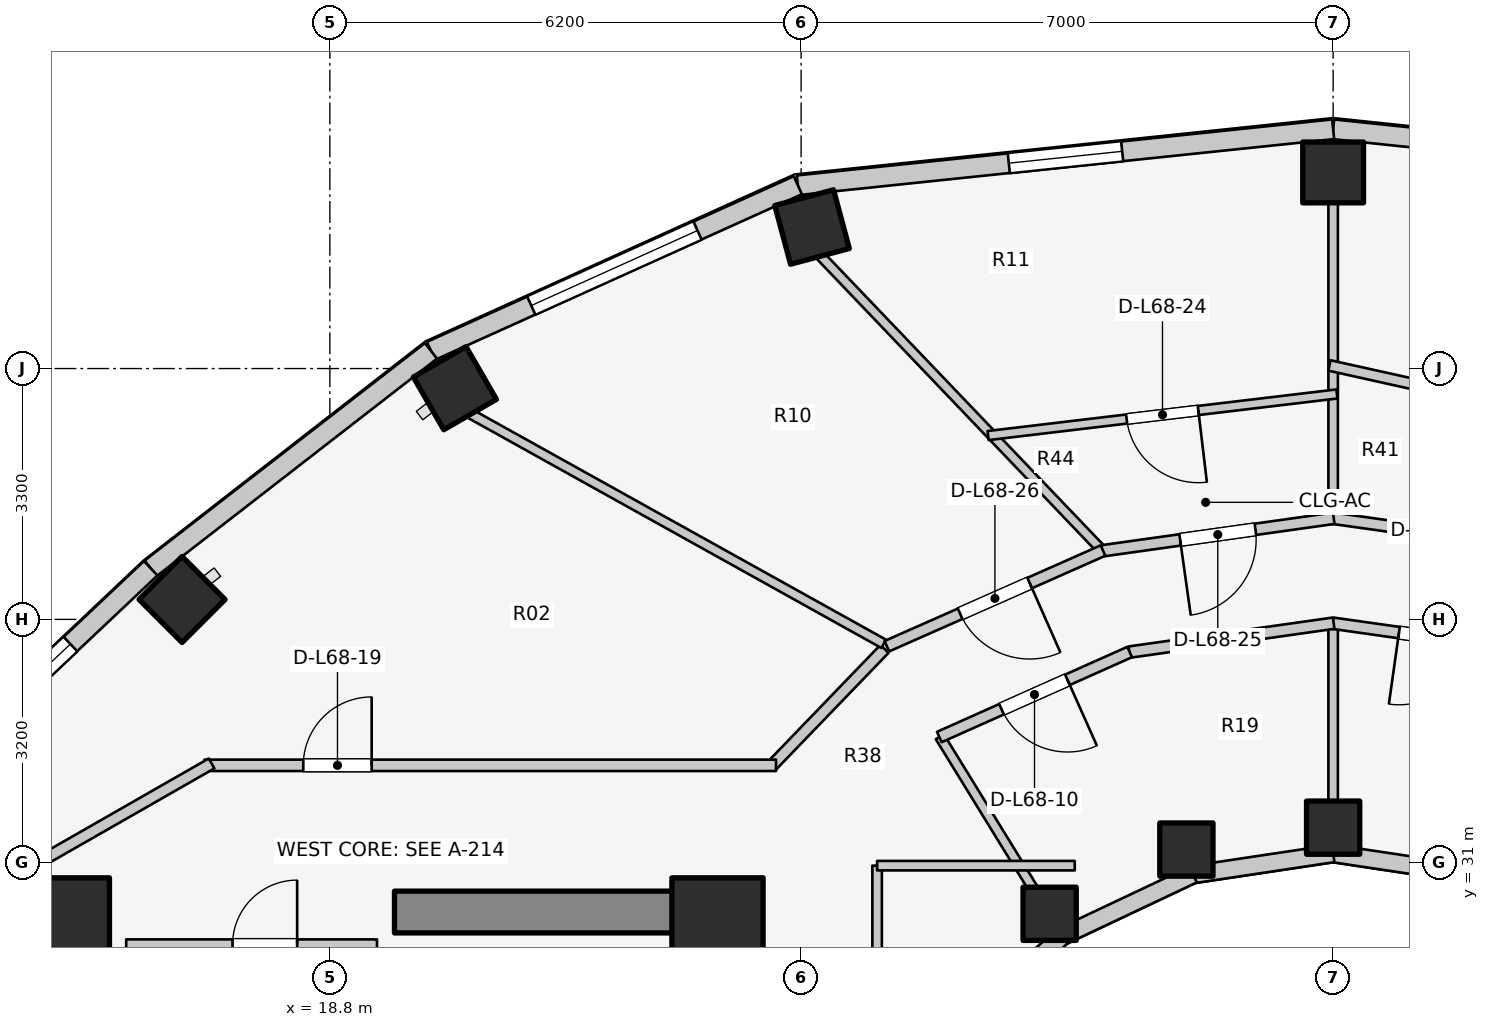
"""IFC4 building model, lengths in metres.
Left out: names, types, materials, properties, quantities, classifications, styles, units other than length and angle.
Written with IfcOpenShell. Run it as: python <this file> out.ifc"""

import sys

from ifc_helpers import new_model, si_unit, direction, frame, frame_2d, origin, origin_2d, place, context, subcontext, project, spatial, rectangle, extrude, element, fill, save


model = new_model("IFC4")
c1 = context("Model", 3, precision=1e-05, world=origin(), true_north=direction((0.0, 1.0)))
c2 = subcontext(c1, "Body", "Model", "MODEL_VIEW")
j1 = project(units=[si_unit("LENGTHUNIT", "METRE"), si_unit("PLANEANGLEUNIT", "RADIAN")], contexts=[c1])
p1 = place(None, origin())
s1 = spatial("IfcSite", under=j1, at=p1, CompositionType="ELEMENT")
p2 = place(p1, origin())
s2 = spatial("IfcBuilding", under=s1, at=p2, CompositionType="ELEMENT")
p3 = place(p2, frame((0.0, 0.0, 223.3)))
s3 = spatial("IfcBuildingStorey", under=s2, at=p3, CompositionType="ELEMENT", Elevation=223.3)
p4 = place(p3, frame((19.65, 30.35, 0.0), z_axis=(0.0, 0.0, 1.0), x_axis=(1.0, 0.0, 0.0)))
e1 = element("IfcWall", 1, at=p4, inside=s3, PredefinedType="SHEAR", context=c2, shape_type="SweptSolid", body=[
    extrude(rectangle(XDim=4.5, YDim=0.55, at=frame_2d((2.25, 0.0))), origin(), (0.0, 0.0, 1.0), 3.1),
])
for number, where, z_axis, x_axis in (
    (2, (23.9, 30.2, 0.0), (0.0, 0.0, 1.0), (1.0, 0.0, 0.0)),
    (3, (15.3, 30.2, 0.0), (0.0, 0.0, 1.0), (1.0, 0.0, 0.0)),
):
    element("IfcColumn", number, at=place(p3, frame(where, z_axis=z_axis, x_axis=x_axis)), inside=s3, PredefinedType="COLUMN", context=c2, shape_type="SweptSolid", body=[
        extrude(rectangle(XDim=1.2, YDim=1.2, at=origin_2d()), origin(), (0.0, 0.0, 1.0), 3.1),
    ])
p5 = place(p3, frame((32.0, 31.46, 0.0), z_axis=(0.0, 0.0, 1.0), x_axis=(1.0, 0.0, 0.0)))
e4 = element("IfcColumn", 4, at=p5, inside=s3, PredefinedType="COLUMN", context=c2, shape_type="SweptSolid", body=[
    extrude(rectangle(XDim=0.7, YDim=0.7, at=origin_2d()), origin(), (0.0, 0.0, 1.0), 3.1),
])
p6 = place(p3, frame((32.0, 40.08, 0.0), z_axis=(0.0, 0.0, 1.0), x_axis=(0.0, 1.0, 0.0)))
e5 = element("IfcColumn", 5, at=p6, inside=s3, PredefinedType="COLUMN", context=c2, shape_type="SweptSolid", body=[
    extrude(rectangle(XDim=0.8, YDim=0.8, at=origin_2d()), origin(), (0.0, 0.0, 1.0), 3.1),
])
p7 = place(p3, frame((30.069, 31.172, 0.0), z_axis=(0.0, 0.0, 1.0), x_axis=(1.0, 0.0, 0.0)))
e6 = element("IfcColumn", 6, at=p7, inside=s3, PredefinedType="COLUMN", context=c2, shape_type="SweptSolid", body=[
    extrude(rectangle(XDim=0.7, YDim=0.7, at=origin_2d()), origin(), (0.0, 0.0, 1.0), 3.1),
])
p8 = place(p3, frame((25.144, 39.362, 0.0), z_axis=(0.0, 0.0, 1.0), x_axis=(-0.258819045103, 0.965925826289, 0.0)))
e7 = element("IfcColumn", 7, at=p8, inside=s3, PredefinedType="COLUMN", context=c2, shape_type="SweptSolid", body=[
    extrude(rectangle(XDim=0.8, YDim=0.8, at=origin_2d()), origin(), (0.0, 0.0, 1.0), 3.1),
])
p9 = place(p3, frame((28.27, 30.327, 0.0), z_axis=(0.0, 0.0, 1.0), x_axis=(1.0, 0.0, 0.0)))
e8 = element("IfcColumn", 8, at=p9, inside=s3, PredefinedType="COLUMN", context=c2, shape_type="SweptSolid", body=[
    extrude(rectangle(XDim=0.7, YDim=0.7, at=origin_2d()), origin(), (0.0, 0.0, 1.0), 3.1),
])
for number, where, z_axis, x_axis in (
    (9, (20.445, 37.241, 0.0), (0.0, 0.0, 1.0), (-0.5, 0.866, 0.0)),
    (10, (16.855, 34.462, 0.0), (0.0, 0.0, 1.0), (-0.707, 0.707, 0.0)),
):
    element("IfcColumn", number, at=place(p3, frame(where, z_axis=z_axis, x_axis=x_axis)), inside=s3, PredefinedType="COLUMN", context=c2, shape_type="SweptSolid", body=[
        extrude(rectangle(XDim=0.8, YDim=0.8, at=origin_2d()), origin(), (0.0, 0.0, 1.0), 3.1),
    ])
for number, where, z_axis, x_axis in (
    (11, (33.843, 30.843, 0.0), (0.0, 0.0, 1.0), (-0.989, 0.149, 0.0)),
    (12, (32.0, 31.12, 0.0), (0.0, 0.0, 1.0), (-0.989, -0.149, 0.0)),
):
    element("IfcWall", number, at=place(p3, frame(where, z_axis=z_axis, x_axis=x_axis)), inside=s3, PredefinedType="STANDARD", context=c2, shape_type="SweptSolid", body=[
        extrude(rectangle(XDim=1.864, YDim=0.23, at=frame_2d((0.932, 0.0))), origin(), (0.0, 0.0, 1.0), 2.16),
    ])
p10 = place(p3, frame((30.157, 30.843, 0.0), z_axis=(0.0, 0.0, 1.0), x_axis=(-0.904179699603, -0.427152280606, 0.0)))
e13 = element("IfcWall", 13, at=p10, inside=s3, PredefinedType="STANDARD", context=c2, shape_type="SweptSolid", body=[
    extrude(rectangle(XDim=1.899, YDim=0.23, at=frame_2d((0.95, 0.0))), origin(), (0.0, 0.0, 1.0), 2.16),
])
p11 = place(p3, frame((28.44, 30.032, 0.0), z_axis=(0.0, 0.0, 1.0), x_axis=(-0.752576694707, -0.658504607869, 0.0)))
e14 = element("IfcWall", 14, at=p11, inside=s3, PredefinedType="STANDARD", context=c2, shape_type="SweptSolid", body=[
    extrude(rectangle(XDim=1.959, YDim=0.23, at=frame_2d((0.98, 0.0))), origin(), (0.0, 0.0, 1.0), 2.16),
])
p12 = place(p3, frame((39.043, 39.912, 0.0), z_axis=(0.0, 0.0, 1.0), x_axis=(-0.994582822721, 0.103947144014, 0.0)))
e15 = element("IfcWall", 15, at=p12, inside=s3, PredefinedType="STANDARD", context=c2, shape_type="SweptSolid", body=[
    extrude(rectangle(XDim=7.081, YDim=0.26, at=frame_2d((3.541, 0.0))), origin(), (0.0, 0.0, 1.0), 2.85),
])
p13 = place(p12, frame((2.791, 0.0, 0.75)))
e16 = element("IfcOpeningElement", 16, at=p13, cuts=e15, PredefinedType="OPENING", context=c2, shape_type="SweptSolid", body=[
    extrude(rectangle(XDim=1.5, YDim=1.6, at=frame_2d((0.75, 0.8))), frame((0.0, 0.14, 0.0), z_axis=(0.0, -1.0, 0.0), x_axis=(1.0, 0.0, 0.0)), (0.0, 0.0, 1.0), 0.28),
])
p14 = place(p3, frame((32.0, 40.648, 0.0), z_axis=(0.0, 0.0, 1.0), x_axis=(-0.994582822721, -0.103947144014, 0.0)))
e17 = element("IfcWall", 17, at=p14, inside=s3, PredefinedType="STANDARD", context=c2, shape_type="SweptSolid", body=[
    extrude(rectangle(XDim=7.081, YDim=0.26, at=frame_2d((3.541, 0.0))), origin(), (0.0, 0.0, 1.0), 2.85),
])
p15 = place(p14, frame((2.791, 0.0, 0.75)))
e18 = element("IfcOpeningElement", 18, at=p15, cuts=e17, PredefinedType="OPENING", context=c2, shape_type="SweptSolid", body=[
    extrude(rectangle(XDim=1.5, YDim=1.6, at=frame_2d((0.75, 0.8))), frame((0.0, 0.14, 0.0), z_axis=(0.0, -1.0, 0.0), x_axis=(1.0, 0.0, 0.0)), (0.0, 0.0, 1.0), 0.28),
])
p16 = place(p3, frame((24.957, 39.912, 0.0), z_axis=(0.0, 0.0, 1.0), x_axis=(-0.911427484938, -0.411460738952, 0.0)))
e19 = element("IfcWall", 19, at=p16, inside=s3, PredefinedType="STANDARD", context=c2, shape_type="SweptSolid", body=[
    extrude(rectangle(XDim=5.296, YDim=0.26, at=frame_2d((2.648, 0.0))), origin(), (0.0, 0.0, 1.0), 2.85),
])
p17 = place(p16, frame((1.448, 0.0, 0.75)))
e20 = element("IfcOpeningElement", 20, at=p17, cuts=e19, PredefinedType="OPENING", context=c2, shape_type="SweptSolid", body=[
    extrude(rectangle(XDim=2.4, YDim=1.7, at=frame_2d((1.2, 0.85))), frame((0.0, 0.14, 0.0), z_axis=(0.0, -1.0, 0.0), x_axis=(1.0, 0.0, 0.0)), (0.0, 0.0, 1.0), 0.28),
])
p18 = place(p3, frame((20.13, 37.733, 0.0), z_axis=(0.0, 0.0, 1.0), x_axis=(-0.790126214723, -0.612944177563, 0.0)))
e21 = element("IfcWall", 21, at=p18, inside=s3, PredefinedType="STANDARD", context=c2, shape_type="SweptSolid", body=[
    extrude(rectangle(XDim=4.667, YDim=0.26, at=frame_2d((2.333, 0.0))), origin(), (0.0, 0.0, 1.0), 2.85),
])
p19 = place(p3, frame((16.442, 34.872, 0.0), z_axis=(0.0, 0.0, 1.0), x_axis=(-0.72731899451, -0.686299555752, 0.0)))
e22 = element("IfcWall", 22, at=p19, inside=s3, PredefinedType="STANDARD", context=c2, shape_type="SweptSolid", body=[
    extrude(rectangle(XDim=4.404, YDim=0.26, at=frame_2d((2.202, 0.0))), origin(), (0.0, 0.0, 1.0), 2.85),
])
p20 = place(p19, frame((1.452, 0.0, 0.75)))
e23 = element("IfcOpeningElement", 23, at=p20, cuts=e22, PredefinedType="OPENING", context=c2, shape_type="SweptSolid", body=[
    extrude(rectangle(XDim=1.5, YDim=1.6, at=frame_2d((0.75, 0.8))), frame((0.0, 0.14, 0.0), z_axis=(0.0, -1.0, 0.0), x_axis=(1.0, 0.0, 0.0)), (0.0, 0.0, 1.0), 0.28),
])
p21 = place(p3, frame((16.12, 29.92, 0.0), z_axis=(0.0, 0.0, 1.0), x_axis=(1.0, 0.0, 0.0)))
e24 = element("IfcWall", 24, at=p21, inside=s3, PredefinedType="PLUMBINGWALL", context=c2, shape_type="SweptSolid", body=[
    extrude(rectangle(XDim=3.3, YDim=0.14, at=frame_2d((1.65, 0.0))), origin(), (0.0, 0.0, 1.0), 2.855),
])
p22 = place(p21, frame((1.399, 0.0, 0.0)))
e25 = element("IfcOpeningElement", 25, at=p22, cuts=e24, PredefinedType="OPENING", context=c2, shape_type="SweptSolid", body=[
    extrude(rectangle(XDim=0.85, YDim=2.05, at=frame_2d((0.425, 1.025))), frame((0.0, 0.08, 0.0), z_axis=(0.0, -1.0, 0.0), x_axis=(1.0, 0.0, 0.0)), (0.0, 0.0, 1.0), 0.16),
])
p23 = place(p3, frame((32.0, 31.1, 0.0), z_axis=(0.0, 0.0, 1.0), x_axis=(0.0, 1.0, 0.0)))
e26 = element("IfcWall", 26, at=p23, inside=s3, PredefinedType="PARTITIONING", context=c2, shape_type="SweptSolid", body=[
    extrude(rectangle(XDim=3.05, YDim=0.125, at=frame_2d((1.525, 0.0))), origin(), (0.0, 0.0, 1.0), 2.376),
])
p24 = place(p3, frame((28.45, 30.015, 0.0), z_axis=(0.0, 0.0, 1.0), x_axis=(-0.523992004803, 0.851723182086, 0.0)))
e27 = element("IfcWall", 27, at=p24, inside=s3, PredefinedType="PARTITIONING", context=c2, shape_type="SweptSolid", body=[
    extrude(rectangle(XDim=3.101, YDim=0.125, at=frame_2d((1.551, 0.0))), origin(), (0.0, 0.0, 1.0), 2.376),
])
p25 = place(p3, frame((34.68, 33.77, 0.0), z_axis=(0.0, 0.0, 1.0), x_axis=(-0.990132151456, 0.140136799779, 0.0)))
e28 = element("IfcWall", 28, at=p25, inside=s3, PredefinedType="PARTITIONING", context=c2, shape_type="SweptSolid", body=[
    extrude(rectangle(XDim=2.714, YDim=0.15, at=frame_2d((1.357, 0.0))), origin(), (0.0, 0.0, 1.0), 2.376),
])
p26 = place(p25, frame((0.882, 0.0, 0.0)))
e29 = element("IfcOpeningElement", 29, at=p26, cuts=e28, PredefinedType="OPENING", context=c2, shape_type="SweptSolid", body=[
    extrude(rectangle(XDim=0.95, YDim=2.1, at=frame_2d((0.475, 1.05))), frame((0.0, 0.085, 0.0), z_axis=(0.0, -1.0, 0.0), x_axis=(1.0, 0.0, 0.0)), (0.0, 0.0, 1.0), 0.17),
])
p27 = place(p3, frame((32.007, 34.15, 0.0), z_axis=(0.0, 0.0, 1.0), x_axis=(-0.990132151456, -0.140136799779, 0.0)))
e30 = element("IfcWall", 30, at=p27, inside=s3, PredefinedType="PARTITIONING", context=c2, shape_type="SweptSolid", body=[
    extrude(rectangle(XDim=2.714, YDim=0.15, at=frame_2d((1.357, 0.0))), origin(), (0.0, 0.0, 1.0), 2.376),
])
p28 = place(p3, frame((29.323, 33.771, 0.0), z_axis=(0.0, 0.0, 1.0), x_axis=(-0.913120130558, -0.407690602257, 0.0)))
e31 = element("IfcWall", 31, at=p28, inside=s3, PredefinedType="PARTITIONING", context=c2, shape_type="SweptSolid", body=[
    extrude(rectangle(XDim=2.743, YDim=0.15, at=frame_2d((1.371, 0.0))), origin(), (0.0, 0.0, 1.0), 2.376),
])
p29 = place(p28, frame((0.896, 0.0, 0.0)))
e32 = element("IfcOpeningElement", 32, at=p29, cuts=e31, PredefinedType="OPENING", context=c2, shape_type="SweptSolid", body=[
    extrude(rectangle(XDim=0.95, YDim=2.1, at=frame_2d((0.475, 1.05))), frame((0.0, 0.085, 0.0), z_axis=(0.0, -1.0, 0.0), x_axis=(1.0, 0.0, 0.0)), (0.0, 0.0, 1.0), 0.17),
])
p30 = place(p3, frame((26.0, 25.8, 0.0), z_axis=(0.0, 0.0, 1.0), x_axis=(0.0, 1.0, 0.0)))
e33 = element("IfcWall", 33, at=p30, inside=s3, PredefinedType="PARTITIONING", context=c2, shape_type="SweptSolid", body=[
    extrude(rectangle(XDim=5.16, YDim=0.125, at=frame_2d((2.58, 0.0))), origin(), (0.0, 0.0, 1.0), 2.232),
])
p31 = place(p3, frame((26.0, 30.96, 0.0), z_axis=(0.0, 0.0, 1.0), x_axis=(1.0, 0.0, 0.0)))
e34 = element("IfcWall", 34, at=p31, inside=s3, PredefinedType="PARTITIONING", context=c2, shape_type="SweptSolid", body=[
    extrude(rectangle(XDim=2.6, YDim=0.125, at=frame_2d((1.3, 0.0))), origin(), (0.0, 0.0, 1.0), 2.376),
])
p32 = place(p3, frame((26.097, 33.812, 0.0), z_axis=(0.0, 0.0, 1.0), x_axis=(-0.694032962553, -0.719943224768, 0.0)))
e35 = element("IfcWall", 35, at=p32, inside=s3, PredefinedType="PARTITIONING", context=c2, shape_type="SweptSolid", body=[
    extrude(rectangle(XDim=2.158, YDim=0.15, at=frame_2d((1.079, 0.0))), origin(), (0.0, 0.0, 1.0), 2.376),
])
p33 = place(p3, frame((17.15, 32.28, 0.0), z_axis=(0.0, 0.0, 1.0), x_axis=(1.0, 0.0, 0.0)))
e36 = element("IfcWall", 36, at=p33, inside=s3, PredefinedType="PARTITIONING", context=c2, shape_type="SweptSolid", body=[
    extrude(rectangle(XDim=7.52, YDim=0.15, at=frame_2d((3.76, 0.0))), origin(), (0.0, 0.0, 1.0), 2.376),
])
p34 = place(p33, frame((1.3, 0.0, 0.0)))
e37 = element("IfcOpeningElement", 37, at=p34, cuts=e36, PredefinedType="OPENING", context=c2, shape_type="SweptSolid", body=[
    extrude(rectangle(XDim=0.9, YDim=2.1, at=frame_2d((0.45, 1.05))), frame((0.0, 0.085, 0.0), z_axis=(0.0, -1.0, 0.0), x_axis=(1.0, 0.0, 0.0)), (0.0, 0.0, 1.0), 0.17),
])
p35 = place(p3, frame((17.243, 32.305, 0.0), z_axis=(0.0, 0.0, 1.0), x_axis=(-0.867991349648, -0.496579315857, 0.0)))
e38 = element("IfcWall", 38, at=p35, inside=s3, PredefinedType="PARTITIONING", context=c2, shape_type="SweptSolid", body=[
    extrude(rectangle(XDim=2.567, YDim=0.15, at=frame_2d((1.283, 0.0))), origin(), (0.0, 0.0, 1.0), 2.22),
])
p36 = place(p3, frame((32.0, 35.585, 0.0), z_axis=(0.0, 0.0, 1.0), x_axis=(0.0, 1.0, 0.0)))
e39 = element("IfcWall", 39, at=p36, inside=s3, PredefinedType="PARTITIONING", context=c2, shape_type="SweptSolid", body=[
    extrude(rectangle(XDim=4.115, YDim=0.125, at=frame_2d((2.058, 0.0))), origin(), (0.0, 0.0, 1.0), 2.376),
])
p37 = place(p3, frame((28.926, 35.143, 0.0), z_axis=(0.0, 0.0, 1.0), x_axis=(-0.691128003726, 0.722732372642, 0.0)))
e40 = element("IfcWall", 40, at=p37, inside=s3, PredefinedType="PARTITIONING", context=c2, shape_type="SweptSolid", body=[
    extrude(rectangle(XDim=5.33, YDim=0.125, at=frame_2d((2.665, 0.0))), origin(), (0.0, 0.0, 1.0), 2.376),
])
p38 = place(p3, frame((26.087, 33.878, 0.0), z_axis=(0.0, 0.0, 1.0), x_axis=(-0.87377679808, 0.486327160599, 0.0)))
e41 = element("IfcWall", 41, at=p38, inside=s3, PredefinedType="PARTITIONING", context=c2, shape_type="SweptSolid", body=[
    extrude(rectangle(XDim=6.24, YDim=0.125, at=frame_2d((3.12, 0.0))), origin(), (0.0, 0.0, 1.0), 2.376),
])
p39 = place(p3, frame((35.085, 35.096, 0.0), z_axis=(0.0, 0.0, 1.0), x_axis=(-0.990254086283, 0.139272555084, 0.0)))
e42 = element("IfcWall", 42, at=p39, inside=s3, PredefinedType="PARTITIONING", context=c2, shape_type="SweptSolid", body=[
    extrude(rectangle(XDim=3.166, YDim=0.15, at=frame_2d((1.583, 0.0))), origin(), (0.0, 0.0, 1.0), 2.376),
])
p40 = place(p3, frame((36.467, 36.538, 0.0), z_axis=(0.0, 0.0, 1.0), x_axis=(-0.976214372251, 0.21680751696, 0.0)))
e43 = element("IfcWall", 43, at=p40, inside=s3, PredefinedType="PLUMBINGWALL", context=c2, shape_type="SweptSolid", body=[
    extrude(rectangle(XDim=4.626, YDim=0.14, at=frame_2d((2.313, 0.0))), origin(), (0.0, 0.0, 1.0), 2.376),
])
p41 = place(p40, frame((1.863, 0.0, 0.0)))
e44 = element("IfcOpeningElement", 44, at=p41, cuts=e43, PredefinedType="OPENING", context=c2, shape_type="SweptSolid", body=[
    extrude(rectangle(XDim=0.9, YDim=2.1, at=frame_2d((0.45, 1.05))), frame((0.0, 0.08, 0.0), z_axis=(0.0, -1.0, 0.0), x_axis=(1.0, 0.0, 0.0)), (0.0, 0.0, 1.0), 0.16),
])
p42 = place(p3, frame((32.05, 37.166, 0.0), z_axis=(0.0, 0.0, 1.0), x_axis=(-0.992963303559, -0.118422454736, 0.0)))
e45 = element("IfcWall", 45, at=p42, inside=s3, PredefinedType="MOVABLE", context=c2, shape_type="SweptSolid", body=[
    extrude(rectangle(XDim=4.622, YDim=0.12, at=frame_2d((2.311, 0.0))), origin(), (0.0, 0.0, 1.0), 2.376),
])
p43 = place(p42, frame((1.836, 0.0, 0.0)))
e46 = element("IfcOpeningElement", 46, at=p43, cuts=e45, PredefinedType="OPENING", context=c2, shape_type="SweptSolid", body=[
    extrude(rectangle(XDim=0.95, YDim=2.1, at=frame_2d((0.475, 1.05))), frame((0.0, 0.07, 0.0), z_axis=(0.0, -1.0, 0.0), x_axis=(1.0, 0.0, 0.0)), (0.0, 0.0, 1.0), 0.14),
])
p44 = place(p3, frame((32.008, 35.53, 0.0), z_axis=(0.0, 0.0, 1.0), x_axis=(-0.990257602807, -0.139247549651, 0.0)))
e47 = element("IfcWall", 47, at=p44, inside=s3, PredefinedType="PARTITIONING", context=c2, shape_type="SweptSolid", body=[
    extrude(rectangle(XDim=3.082, YDim=0.15, at=frame_2d((1.541, 0.0))), origin(), (0.0, 0.0, 1.0), 2.376),
])
p45 = place(p44, frame((1.041, 0.0, 0.0)))
e48 = element("IfcOpeningElement", 48, at=p45, cuts=e47, PredefinedType="OPENING", context=c2, shape_type="SweptSolid", body=[
    extrude(rectangle(XDim=1.0, YDim=2.1, at=frame_2d((0.5, 1.05))), frame((0.0, 0.085, 0.0), z_axis=(0.0, -1.0, 0.0), x_axis=(1.0, 0.0, 0.0)), (0.0, 0.0, 1.0), 0.17),
])
p46 = place(p3, frame((28.972, 35.105, 0.0), z_axis=(0.0, 0.0, 1.0), x_axis=(-0.914490094652, -0.40460828808, 0.0)))
e49 = element("IfcWall", 49, at=p46, inside=s3, PredefinedType="PARTITIONING", context=c2, shape_type="SweptSolid", body=[
    extrude(rectangle(XDim=3.11, YDim=0.15, at=frame_2d((1.555, 0.0))), origin(), (0.0, 0.0, 1.0), 2.376),
])
p47 = place(p46, frame((1.055, 0.0, 0.0)))
e50 = element("IfcOpeningElement", 50, at=p47, cuts=e49, PredefinedType="OPENING", context=c2, shape_type="SweptSolid", body=[
    extrude(rectangle(XDim=1.0, YDim=2.1, at=frame_2d((0.5, 1.05))), frame((0.0, 0.085, 0.0), z_axis=(0.0, -1.0, 0.0), x_axis=(1.0, 0.0, 0.0)), (0.0, 0.0, 1.0), 0.17),
])
p48 = place(p15, origin())
e51 = element("IfcWindow", 51, at=p48, inside=s3, PartitioningType="SINGLE_PANEL", PredefinedType="WINDOW", context=c2, shape_type="SweptSolid", body=[
    extrude(rectangle(XDim=1.5, YDim=1.6, at=frame_2d((0.75, 0.8))), frame((0.0, 0.03, 0.0), z_axis=(0.0, -1.0, 0.0), x_axis=(1.0, 0.0, 0.0)), (0.0, 0.0, 1.0), 0.06),
])
fill(e18, e51)
p49 = place(p17, origin())
e52 = element("IfcWindow", 52, at=p49, inside=s3, PartitioningType="SINGLE_PANEL", PredefinedType="WINDOW", context=c2, shape_type="SweptSolid", body=[
    extrude(rectangle(XDim=2.4, YDim=1.7, at=frame_2d((1.2, 0.85))), frame((0.0, 0.03, 0.0), z_axis=(0.0, -1.0, 0.0), x_axis=(1.0, 0.0, 0.0)), (0.0, 0.0, 1.0), 0.06),
])
fill(e20, e52)
p50 = place(p20, origin())
e53 = element("IfcWindow", 53, at=p50, inside=s3, PartitioningType="SINGLE_PANEL", PredefinedType="WINDOW", context=c2, shape_type="SweptSolid", body=[
    extrude(rectangle(XDim=1.5, YDim=1.6, at=frame_2d((0.75, 0.8))), frame((0.0, 0.03, 0.0), z_axis=(0.0, -1.0, 0.0), x_axis=(1.0, 0.0, 0.0)), (0.0, 0.0, 1.0), 0.06),
])
fill(e23, e53)
p51 = place(p22, origin())
e54 = element("IfcDoor", 54, at=p51, inside=s3, OperationType="SINGLE_SWING_RIGHT", PredefinedType="DOOR", context=c2, shape_type="SweptSolid", body=[
    extrude(rectangle(XDim=0.85, YDim=2.05, at=frame_2d((0.425, 1.025))), frame((0.0, 0.025, 0.0), z_axis=(0.0, -1.0, 0.0), x_axis=(1.0, 0.0, 0.0)), (0.0, 0.0, 1.0), 0.05),
])
fill(e25, e54)
p52 = place(p26, origin())
e55 = element("IfcDoor", 55, at=p52, inside=s3, OperationType="SINGLE_SWING_RIGHT", PredefinedType="DOOR", context=c2, shape_type="SweptSolid", body=[
    extrude(rectangle(XDim=0.95, YDim=2.1, at=frame_2d((0.475, 1.05))), frame((0.0, 0.025, 0.0), z_axis=(0.0, -1.0, 0.0), x_axis=(1.0, 0.0, 0.0)), (0.0, 0.0, 1.0), 0.05),
])
fill(e29, e55)
p53 = place(p29, origin())
e56 = element("IfcDoor", 56, at=p53, inside=s3, OperationType="SINGLE_SWING_LEFT", PredefinedType="DOOR", context=c2, shape_type="SweptSolid", body=[
    extrude(rectangle(XDim=0.95, YDim=2.1, at=frame_2d((0.475, 1.05))), frame((0.0, 0.025, 0.0), z_axis=(0.0, -1.0, 0.0), x_axis=(1.0, 0.0, 0.0)), (0.0, 0.0, 1.0), 0.05),
])
fill(e32, e56)
p54 = place(p34, origin())
e57 = element("IfcDoor", 57, at=p54, inside=s3, OperationType="SINGLE_SWING_RIGHT", PredefinedType="DOOR", context=c2, shape_type="SweptSolid", body=[
    extrude(rectangle(XDim=0.9, YDim=2.1, at=frame_2d((0.45, 1.05))), frame((0.0, 0.025, 0.0), z_axis=(0.0, -1.0, 0.0), x_axis=(1.0, 0.0, 0.0)), (0.0, 0.0, 1.0), 0.05),
])
fill(e37, e57)
p55 = place(p43, origin())
e58 = element("IfcDoor", 58, at=p55, inside=s3, OperationType="SINGLE_SWING_LEFT", PredefinedType="DOOR", context=c2, shape_type="SweptSolid", body=[
    extrude(rectangle(XDim=0.95, YDim=2.1, at=frame_2d((0.475, 1.05))), frame((0.0, 0.025, 0.0), z_axis=(0.0, -1.0, 0.0), x_axis=(1.0, 0.0, 0.0)), (0.0, 0.0, 1.0), 0.05),
])
fill(e46, e58)
p56 = place(p45, origin())
e59 = element("IfcDoor", 59, at=p56, inside=s3, OperationType="SINGLE_SWING_RIGHT", PredefinedType="DOOR", context=c2, shape_type="SweptSolid", body=[
    extrude(rectangle(XDim=1.0, YDim=2.1, at=frame_2d((0.5, 1.05))), frame((0.0, 0.025, 0.0), z_axis=(0.0, -1.0, 0.0), x_axis=(1.0, 0.0, 0.0)), (0.0, 0.0, 1.0), 0.05),
])
fill(e48, e59)
p57 = place(p47, origin())
e60 = element("IfcDoor", 60, at=p57, inside=s3, OperationType="SINGLE_SWING_LEFT", PredefinedType="DOOR", context=c2, shape_type="SweptSolid", body=[
    extrude(rectangle(XDim=1.0, YDim=2.1, at=frame_2d((0.5, 1.05))), frame((0.0, 0.025, 0.0), z_axis=(0.0, -1.0, 0.0), x_axis=(1.0, 0.0, 0.0)), (0.0, 0.0, 1.0), 0.05),
])
fill(e50, e60)
save(model, sys.argv[1])
